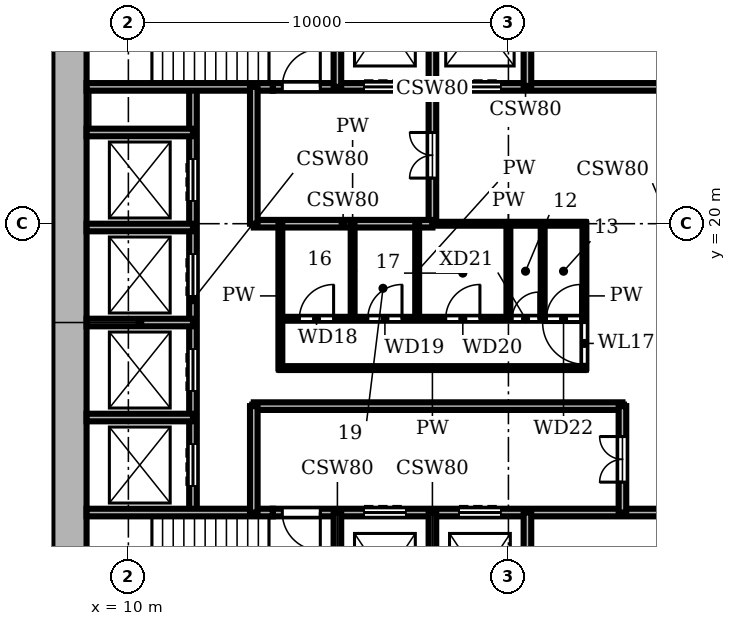
"""IFC4 building model, lengths in metres.
Left out: names, types, materials, properties, quantities, classifications, styles, units other than length and angle.
Written with IfcOpenShell. Run it as: python <this file> out.ifc"""

import sys

from ifc_helpers import new_model, si_unit, direction, frame, frame_2d, origin, place, context, subcontext, project, spatial, rectangle, extrude, element, fill, save


model = new_model("IFC4")
c1 = context("Model", 3, precision=1e-05, world=origin(), true_north=direction((0.0, 1.0)))
c2 = subcontext(c1, "Body", "Model", "MODEL_VIEW")
j1 = project(units=[si_unit("LENGTHUNIT", "METRE"), si_unit("PLANEANGLEUNIT", "RADIAN")], contexts=[c1])
p1 = place(None, origin())
s1 = spatial("IfcSite", under=j1, at=p1, CompositionType="ELEMENT")
p2 = place(p1, origin())
s2 = spatial("IfcBuilding", under=s1, at=p2, CompositionType="ELEMENT")
p3 = place(p2, frame((0.0, 0.0, 82.2)))
s3 = spatial("IfcBuildingStorey", under=s2, at=p3, CompositionType="ELEMENT", Elevation=82.2)
p4 = place(p3, frame((8.45, 27.1, 0.0), z_axis=(0.0, 0.0, 1.0), x_axis=(0.0, -1.0, 0.0)))
e1 = element("IfcWall", 1, at=p4, inside=s3, PredefinedType="SHEAR", context=c2, shape_type="SweptSolid", body=[
    extrude(rectangle(XDim=18.2, YDim=0.9, at=frame_2d((9.1, 0.0))), origin(), (0.0, 0.0, 1.0), 3.9),
])
p5 = place(p3, frame((8.9, 12.4, 0.0), z_axis=(0.0, 0.0, 1.0), x_axis=(1.0, 0.0, 0.0)))
e2 = element("IfcWall", 2, at=p5, inside=s3, PredefinedType="SHEAR", context=c2, shape_type="SweptSolid", body=[
    extrude(rectangle(XDim=4.9, YDim=0.2, at=frame_2d((2.45, 0.0))), origin(), (0.0, 0.0, 1.0), 3.58),
])
p6 = place(p3, frame((13.8, 12.4, 0.0), z_axis=(0.0, 0.0, 1.0), x_axis=(1.0, 0.0, 0.0)))
e3 = element("IfcWall", 3, at=p6, inside=s3, PredefinedType="SHEAR", context=c2, shape_type="SweptSolid", body=[
    extrude(rectangle(XDim=13.3, YDim=0.2, at=frame_2d((6.65, 0.0))), origin(), (0.0, 0.0, 1.0), 3.58),
])
p7 = place(p6, frame((2.4, 0.0, 0.0)))
e4 = element("IfcOpeningElement", 4, at=p7, cuts=e3, PredefinedType="OPENING", context=c2, shape_type="SweptSolid", body=[
    extrude(rectangle(XDim=1.1, YDim=2.1, at=frame_2d((0.55, 1.05))), frame((0.0, 0.11, 0.0), z_axis=(0.0, -1.0, 0.0), x_axis=(1.0, 0.0, 0.0)), (0.0, 0.0, 1.0), 0.22),
])
p8 = place(p6, frame((4.9, 0.0, 0.0)))
e5 = element("IfcOpeningElement", 5, at=p8, cuts=e3, PredefinedType="OPENING", context=c2, shape_type="SweptSolid", body=[
    extrude(rectangle(XDim=1.1, YDim=2.1, at=frame_2d((0.55, 1.05))), frame((0.0, 0.11, 0.0), z_axis=(0.0, -1.0, 0.0), x_axis=(1.0, 0.0, 0.0)), (0.0, 0.0, 1.0), 0.22),
])
p9 = place(p6, frame((0.25, 0.0, 0.0)))
e6 = element("IfcOpeningElement", 6, at=p9, cuts=e3, PredefinedType="OPENING", context=c2, shape_type="SweptSolid", body=[
    extrude(rectangle(XDim=1.0, YDim=2.1, at=frame_2d((0.5, 1.05))), frame((0.0, 0.11, 0.0), z_axis=(0.0, -1.0, 0.0), x_axis=(1.0, 0.0, 0.0)), (0.0, 0.0, 1.0), 0.22),
])
p10 = place(p3, frame((8.9, 14.9, 0.0), z_axis=(0.0, 0.0, 1.0), x_axis=(1.0, 0.0, 0.0)))
e7 = element("IfcWall", 7, at=p10, inside=s3, PredefinedType="SHEAR", context=c2, shape_type="SweptSolid", body=[
    extrude(rectangle(XDim=2.8, YDim=0.2, at=frame_2d((1.4, 0.0))), origin(), (0.0, 0.0, 1.0), 3.58),
])
p11 = place(p3, frame((13.3, 15.2, 0.0), z_axis=(0.0, 0.0, 1.0), x_axis=(1.0, 0.0, 0.0)))
e8 = element("IfcWall", 8, at=p11, inside=s3, PredefinedType="SHEAR", context=c2, shape_type="SweptSolid", body=[
    extrude(rectangle(XDim=9.7, YDim=0.2, at=frame_2d((4.85, 0.0))), origin(), (0.0, 0.0, 1.0), 3.58),
])
p12 = place(p3, frame((14.0, 16.2, 0.0), z_axis=(0.0, 0.0, 1.0), x_axis=(1.0, 0.0, 0.0)))
e9 = element("IfcWall", 9, at=p12, inside=s3, PredefinedType="PARTITIONING", context=c2, shape_type="SweptSolid", body=[
    extrude(rectangle(XDim=8.0, YDim=0.1, at=frame_2d((4.0, 0.0))), origin(), (0.0, 0.0, 1.0), 3.58),
])
p13 = place(p3, frame((8.9, 17.4, 0.0), z_axis=(0.0, 0.0, 1.0), x_axis=(1.0, 0.0, 0.0)))
e10 = element("IfcWall", 10, at=p13, inside=s3, PredefinedType="SHEAR", context=c2, shape_type="SweptSolid", body=[
    extrude(rectangle(XDim=2.8, YDim=0.2, at=frame_2d((1.4, 0.0))), origin(), (0.0, 0.0, 1.0), 3.58),
])
p14 = place(p3, frame((14.0, 17.5, 0.0), z_axis=(0.0, 0.0, 1.0), x_axis=(1.0, 0.0, 0.0)))
e11 = element("IfcWall", 11, at=p14, inside=s3, PredefinedType="PARTITIONING", context=c2, shape_type="SweptSolid", body=[
    extrude(rectangle(XDim=8.0, YDim=0.1, at=frame_2d((4.0, 0.0))), origin(), (0.0, 0.0, 1.0), 3.58),
])
p15 = place(p14, frame((0.5, 0.0, 0.0)))
e12 = element("IfcOpeningElement", 12, at=p15, cuts=e11, PredefinedType="OPENING", context=c2, shape_type="SweptSolid", body=[
    extrude(rectangle(XDim=0.9, YDim=2.1, at=frame_2d((0.45, 1.05))), frame((0.0, 0.06, 0.0), z_axis=(0.0, -1.0, 0.0), x_axis=(1.0, 0.0, 0.0)), (0.0, 0.0, 1.0), 0.12),
])
p16 = place(p14, frame((2.3, 0.0, 0.0)))
e13 = element("IfcOpeningElement", 13, at=p16, cuts=e11, PredefinedType="OPENING", context=c2, shape_type="SweptSolid", body=[
    extrude(rectangle(XDim=0.9, YDim=2.1, at=frame_2d((0.45, 1.05))), frame((0.0, 0.06, 0.0), z_axis=(0.0, -1.0, 0.0), x_axis=(1.0, 0.0, 0.0)), (0.0, 0.0, 1.0), 0.12),
])
p17 = place(p14, frame((4.35, 0.0, 0.0)))
e14 = element("IfcOpeningElement", 14, at=p17, cuts=e11, PredefinedType="OPENING", context=c2, shape_type="SweptSolid", body=[
    extrude(rectangle(XDim=0.9, YDim=2.1, at=frame_2d((0.45, 1.05))), frame((0.0, 0.06, 0.0), z_axis=(0.0, -1.0, 0.0), x_axis=(1.0, 0.0, 0.0)), (0.0, 0.0, 1.0), 0.12),
])
p18 = place(p14, frame((6.1, 0.0, 0.0)))
e15 = element("IfcOpeningElement", 15, at=p18, cuts=e11, PredefinedType="OPENING", context=c2, shape_type="SweptSolid", body=[
    extrude(rectangle(XDim=0.7, YDim=2.1, at=frame_2d((0.35, 1.05))), frame((0.0, 0.06, 0.0), z_axis=(0.0, -1.0, 0.0), x_axis=(1.0, 0.0, 0.0)), (0.0, 0.0, 1.0), 0.12),
])
p19 = place(p14, frame((7.0, 0.0, 0.0)))
e16 = element("IfcOpeningElement", 16, at=p19, cuts=e11, PredefinedType="OPENING", context=c2, shape_type="SweptSolid", body=[
    extrude(rectangle(XDim=0.9, YDim=2.1, at=frame_2d((0.45, 1.05))), frame((0.0, 0.06, 0.0), z_axis=(0.0, -1.0, 0.0), x_axis=(1.0, 0.0, 0.0)), (0.0, 0.0, 1.0), 0.12),
])
p20 = place(p3, frame((8.9, 19.9, 0.0), z_axis=(0.0, 0.0, 1.0), x_axis=(1.0, 0.0, 0.0)))
e17 = element("IfcWall", 17, at=p20, inside=s3, PredefinedType="SHEAR", context=c2, shape_type="SweptSolid", body=[
    extrude(rectangle(XDim=2.8, YDim=0.2, at=frame_2d((1.4, 0.0))), origin(), (0.0, 0.0, 1.0), 3.58),
])
p21 = place(p3, frame((18.0, 20.0, 0.0), z_axis=(0.0, 0.0, 1.0), x_axis=(1.0, 0.0, 0.0)))
e18 = element("IfcWall", 18, at=p21, inside=s3, PredefinedType="PARTITIONING", context=c2, shape_type="SweptSolid", body=[
    extrude(rectangle(XDim=4.0, YDim=0.1, at=frame_2d((2.0, 0.0))), origin(), (0.0, 0.0, 1.0), 3.58),
])
p22 = place(p3, frame((13.3, 20.0, 0.0), z_axis=(0.0, 0.0, 1.0), x_axis=(1.0, 0.0, 0.0)))
e19 = element("IfcWall", 19, at=p22, inside=s3, PredefinedType="SHEAR", context=c2, shape_type="SweptSolid", body=[
    extrude(rectangle(XDim=4.7, YDim=0.2, at=frame_2d((2.35, 0.0))), origin(), (0.0, 0.0, 1.0), 3.58),
])
p23 = place(p3, frame((8.9, 22.4, 0.0), z_axis=(0.0, 0.0, 1.0), x_axis=(1.0, 0.0, 0.0)))
e20 = element("IfcWall", 20, at=p23, inside=s3, PredefinedType="SHEAR", context=c2, shape_type="SweptSolid", body=[
    extrude(rectangle(XDim=2.8, YDim=0.2, at=frame_2d((1.4, 0.0))), origin(), (0.0, 0.0, 1.0), 3.58),
])
p24 = place(p3, frame((8.9, 23.6, 0.0), z_axis=(0.0, 0.0, 1.0), x_axis=(1.0, 0.0, 0.0)))
e21 = element("IfcWall", 21, at=p24, inside=s3, PredefinedType="SHEAR", context=c2, shape_type="SweptSolid", body=[
    extrude(rectangle(XDim=4.9, YDim=0.2, at=frame_2d((2.45, 0.0))), origin(), (0.0, 0.0, 1.0), 3.58),
])
p25 = place(p3, frame((13.8, 23.6, 0.0), z_axis=(0.0, 0.0, 1.0), x_axis=(1.0, 0.0, 0.0)))
e22 = element("IfcWall", 22, at=p25, inside=s3, PredefinedType="SHEAR", context=c2, shape_type="SweptSolid", body=[
    extrude(rectangle(XDim=13.3, YDim=0.2, at=frame_2d((6.65, 0.0))), origin(), (0.0, 0.0, 1.0), 3.58),
])
p26 = place(p25, frame((2.4, 0.0, 0.0)))
e23 = element("IfcOpeningElement", 23, at=p26, cuts=e22, PredefinedType="OPENING", context=c2, shape_type="SweptSolid", body=[
    extrude(rectangle(XDim=1.1, YDim=2.1, at=frame_2d((0.55, 1.05))), frame((0.0, 0.11, 0.0), z_axis=(0.0, -1.0, 0.0), x_axis=(1.0, 0.0, 0.0)), (0.0, 0.0, 1.0), 0.22),
])
p27 = place(p25, frame((4.9, 0.0, 0.0)))
e24 = element("IfcOpeningElement", 24, at=p27, cuts=e22, PredefinedType="OPENING", context=c2, shape_type="SweptSolid", body=[
    extrude(rectangle(XDim=1.1, YDim=2.1, at=frame_2d((0.55, 1.05))), frame((0.0, 0.11, 0.0), z_axis=(0.0, -1.0, 0.0), x_axis=(1.0, 0.0, 0.0)), (0.0, 0.0, 1.0), 0.22),
])
p28 = place(p25, frame((0.25, 0.0, 0.0)))
e25 = element("IfcOpeningElement", 25, at=p28, cuts=e22, PredefinedType="OPENING", context=c2, shape_type="SweptSolid", body=[
    extrude(rectangle(XDim=1.0, YDim=2.1, at=frame_2d((0.5, 1.05))), frame((0.0, 0.11, 0.0), z_axis=(0.0, -1.0, 0.0), x_axis=(1.0, 0.0, 0.0)), (0.0, 0.0, 1.0), 0.22),
])
p29 = place(p3, frame((11.7, 12.4, 0.0), z_axis=(0.0, 0.0, 1.0), x_axis=(0.0, 1.0, 0.0)))
e26 = element("IfcWall", 26, at=p29, inside=s3, PredefinedType="SHEAR", context=c2, shape_type="SweptSolid", body=[
    extrude(rectangle(XDim=11.2, YDim=0.2, at=frame_2d((5.6, 0.0))), origin(), (0.0, 0.0, 1.0), 3.58),
])
p30 = place(p29, frame((0.7, 0.0, 0.0)))
e27 = element("IfcOpeningElement", 27, at=p30, cuts=e26, PredefinedType="OPENING", context=c2, shape_type="SweptSolid", body=[
    extrude(rectangle(XDim=1.1, YDim=2.1, at=frame_2d((0.55, 1.05))), frame((0.0, 0.11, 0.0), z_axis=(0.0, -1.0, 0.0), x_axis=(1.0, 0.0, 0.0)), (0.0, 0.0, 1.0), 0.22),
])
p31 = place(p29, frame((3.2, 0.0, 0.0)))
e28 = element("IfcOpeningElement", 28, at=p31, cuts=e26, PredefinedType="OPENING", context=c2, shape_type="SweptSolid", body=[
    extrude(rectangle(XDim=1.1, YDim=2.1, at=frame_2d((0.55, 1.05))), frame((0.0, 0.11, 0.0), z_axis=(0.0, -1.0, 0.0), x_axis=(1.0, 0.0, 0.0)), (0.0, 0.0, 1.0), 0.22),
])
p32 = place(p29, frame((5.7, 0.0, 0.0)))
e29 = element("IfcOpeningElement", 29, at=p32, cuts=e26, PredefinedType="OPENING", context=c2, shape_type="SweptSolid", body=[
    extrude(rectangle(XDim=1.1, YDim=2.1, at=frame_2d((0.55, 1.05))), frame((0.0, 0.11, 0.0), z_axis=(0.0, -1.0, 0.0), x_axis=(1.0, 0.0, 0.0)), (0.0, 0.0, 1.0), 0.22),
])
p33 = place(p29, frame((8.2, 0.0, 0.0)))
e30 = element("IfcOpeningElement", 30, at=p33, cuts=e26, PredefinedType="OPENING", context=c2, shape_type="SweptSolid", body=[
    extrude(rectangle(XDim=1.1, YDim=2.1, at=frame_2d((0.55, 1.05))), frame((0.0, 0.11, 0.0), z_axis=(0.0, -1.0, 0.0), x_axis=(1.0, 0.0, 0.0)), (0.0, 0.0, 1.0), 0.22),
])
p34 = place(p3, frame((13.3, 12.4, 0.0), z_axis=(0.0, 0.0, 1.0), x_axis=(0.0, 1.0, 0.0)))
e31 = element("IfcWall", 31, at=p34, inside=s3, PredefinedType="SHEAR", context=c2, shape_type="SweptSolid", body=[
    extrude(rectangle(XDim=2.8, YDim=0.2, at=frame_2d((1.4, 0.0))), origin(), (0.0, 0.0, 1.0), 3.58),
])
p35 = place(p3, frame((13.3, 20.0, 0.0), z_axis=(0.0, 0.0, 1.0), x_axis=(0.0, 1.0, 0.0)))
e32 = element("IfcWall", 32, at=p35, inside=s3, PredefinedType="SHEAR", context=c2, shape_type="SweptSolid", body=[
    extrude(rectangle(XDim=3.6, YDim=0.2, at=frame_2d((1.8, 0.0))), origin(), (0.0, 0.0, 1.0), 3.58),
])
p36 = place(p3, frame((14.0, 16.2, 0.0), z_axis=(0.0, 0.0, 1.0), x_axis=(0.0, 1.0, 0.0)))
e33 = element("IfcWall", 33, at=p36, inside=s3, PredefinedType="PARTITIONING", context=c2, shape_type="SweptSolid", body=[
    extrude(rectangle(XDim=3.8, YDim=0.1, at=frame_2d((1.9, 0.0))), origin(), (0.0, 0.0, 1.0), 3.58),
])
for number, where, z_axis, x_axis in (
    (34, (15.5, 8.9, 0.0), (0.0, 0.0, 1.0), (0.0, 1.0, 0.0)),
    (35, (15.5, 23.6, 0.0), (0.0, 0.0, 1.0), (0.0, 1.0, 0.0)),
):
    element("IfcWall", number, at=place(p3, frame(where, z_axis=z_axis, x_axis=x_axis)), inside=s3, PredefinedType="SHEAR", context=c2, shape_type="SweptSolid", body=[
        extrude(rectangle(XDim=3.5, YDim=0.2, at=frame_2d((1.75, 0.0))), origin(), (0.0, 0.0, 1.0), 3.58),
    ])
for number, where, z_axis, x_axis in (
    (36, (15.9, 17.5, 0.0), (0.0, 0.0, 1.0), (0.0, 1.0, 0.0)),
    (37, (17.6, 17.5, 0.0), (0.0, 0.0, 1.0), (0.0, 1.0, 0.0)),
):
    element("IfcWall", number, at=place(p3, frame(where, z_axis=z_axis, x_axis=x_axis)), inside=s3, PredefinedType="PARTITIONING", context=c2, shape_type="SweptSolid", body=[
        extrude(rectangle(XDim=2.5, YDim=0.1, at=frame_2d((1.25, 0.0))), origin(), (0.0, 0.0, 1.0), 3.58),
    ])
p37 = place(p3, frame((18.0, 8.9, 0.0), z_axis=(0.0, 0.0, 1.0), x_axis=(0.0, 1.0, 0.0)))
e38 = element("IfcWall", 38, at=p37, inside=s3, PredefinedType="SHEAR", context=c2, shape_type="SweptSolid", body=[
    extrude(rectangle(XDim=3.5, YDim=0.2, at=frame_2d((1.75, 0.0))), origin(), (0.0, 0.0, 1.0), 3.58),
])
p38 = place(p3, frame((18.0, 20.0, 0.0), z_axis=(0.0, 0.0, 1.0), x_axis=(0.0, 1.0, 0.0)))
e39 = element("IfcWall", 39, at=p38, inside=s3, PredefinedType="SHEAR", context=c2, shape_type="SweptSolid", body=[
    extrude(rectangle(XDim=7.1, YDim=0.2, at=frame_2d((3.55, 0.0))), origin(), (0.0, 0.0, 1.0), 3.58),
])
p39 = place(p38, frame((1.2, 0.0, 0.0)))
e40 = element("IfcOpeningElement", 40, at=p39, cuts=e39, PredefinedType="OPENING", context=c2, shape_type="SweptSolid", body=[
    extrude(rectangle(XDim=1.2, YDim=2.1, at=frame_2d((0.6, 1.05))), frame((0.0, 0.11, 0.0), z_axis=(0.0, -1.0, 0.0), x_axis=(1.0, 0.0, 0.0)), (0.0, 0.0, 1.0), 0.22),
])
p40 = place(p3, frame((20.0, 17.5, 0.0), z_axis=(0.0, 0.0, 1.0), x_axis=(0.0, 1.0, 0.0)))
e41 = element("IfcWall", 41, at=p40, inside=s3, PredefinedType="PARTITIONING", context=c2, shape_type="SweptSolid", body=[
    extrude(rectangle(XDim=2.5, YDim=0.1, at=frame_2d((1.25, 0.0))), origin(), (0.0, 0.0, 1.0), 3.58),
])
for number, where, z_axis, x_axis in (
    (42, (20.5, 8.9, 0.0), (0.0, 0.0, 1.0), (0.0, 1.0, 0.0)),
    (43, (20.5, 23.6, 0.0), (0.0, 0.0, 1.0), (0.0, 1.0, 0.0)),
):
    element("IfcWall", number, at=place(p3, frame(where, z_axis=z_axis, x_axis=x_axis)), inside=s3, PredefinedType="SHEAR", context=c2, shape_type="SweptSolid", body=[
        extrude(rectangle(XDim=3.5, YDim=0.2, at=frame_2d((1.75, 0.0))), origin(), (0.0, 0.0, 1.0), 3.58),
    ])
p41 = place(p3, frame((20.9, 17.5, 0.0), z_axis=(0.0, 0.0, 1.0), x_axis=(0.0, 1.0, 0.0)))
e44 = element("IfcWall", 44, at=p41, inside=s3, PredefinedType="PARTITIONING", context=c2, shape_type="SweptSolid", body=[
    extrude(rectangle(XDim=2.5, YDim=0.1, at=frame_2d((1.25, 0.0))), origin(), (0.0, 0.0, 1.0), 3.58),
])
p42 = place(p3, frame((22.0, 16.2, 0.0), z_axis=(0.0, 0.0, 1.0), x_axis=(0.0, 1.0, 0.0)))
e45 = element("IfcWall", 45, at=p42, inside=s3, PredefinedType="PARTITIONING", context=c2, shape_type="SweptSolid", body=[
    extrude(rectangle(XDim=3.8, YDim=0.1, at=frame_2d((1.9, 0.0))), origin(), (0.0, 0.0, 1.0), 3.58),
])
p43 = place(p42, frame((0.1, 0.0, 0.0)))
e46 = element("IfcOpeningElement", 46, at=p43, cuts=e45, PredefinedType="OPENING", context=c2, shape_type="SweptSolid", body=[
    extrude(rectangle(XDim=1.1, YDim=2.1, at=frame_2d((0.55, 1.05))), frame((0.0, 0.06, 0.0), z_axis=(0.0, -1.0, 0.0), x_axis=(1.0, 0.0, 0.0)), (0.0, 0.0, 1.0), 0.12),
])
p44 = place(p3, frame((23.0, 12.4, 0.0), z_axis=(0.0, 0.0, 1.0), x_axis=(0.0, 1.0, 0.0)))
e47 = element("IfcWall", 47, at=p44, inside=s3, PredefinedType="SHEAR", context=c2, shape_type="SweptSolid", body=[
    extrude(rectangle(XDim=2.8, YDim=0.2, at=frame_2d((1.4, 0.0))), origin(), (0.0, 0.0, 1.0), 3.58),
])
p45 = place(p44, frame((0.8, 0.0, 0.0)))
e48 = element("IfcOpeningElement", 48, at=p45, cuts=e47, PredefinedType="OPENING", context=c2, shape_type="SweptSolid", body=[
    extrude(rectangle(XDim=1.2, YDim=2.1, at=frame_2d((0.6, 1.05))), frame((0.0, 0.11, 0.0), z_axis=(0.0, -1.0, 0.0), x_axis=(1.0, 0.0, 0.0)), (0.0, 0.0, 1.0), 0.22),
])
p46 = place(p30, origin())
e49 = element("IfcDoor", 49, at=p46, inside=s3, OperationType="DOUBLE_DOOR_SLIDING", PredefinedType="DOOR", context=c2, shape_type="SweptSolid", body=[
    extrude(rectangle(XDim=1.1, YDim=2.1, at=frame_2d((0.55, 1.05))), frame((0.0, 0.025, 0.0), z_axis=(0.0, -1.0, 0.0), x_axis=(1.0, 0.0, 0.0)), (0.0, 0.0, 1.0), 0.05),
])
fill(e27, e49)
p47 = place(p31, origin())
e50 = element("IfcDoor", 50, at=p47, inside=s3, OperationType="DOUBLE_DOOR_SLIDING", PredefinedType="DOOR", context=c2, shape_type="SweptSolid", body=[
    extrude(rectangle(XDim=1.1, YDim=2.1, at=frame_2d((0.55, 1.05))), frame((0.0, 0.025, 0.0), z_axis=(0.0, -1.0, 0.0), x_axis=(1.0, 0.0, 0.0)), (0.0, 0.0, 1.0), 0.05),
])
fill(e28, e50)
p48 = place(p32, origin())
e51 = element("IfcDoor", 51, at=p48, inside=s3, OperationType="DOUBLE_DOOR_SLIDING", PredefinedType="DOOR", context=c2, shape_type="SweptSolid", body=[
    extrude(rectangle(XDim=1.1, YDim=2.1, at=frame_2d((0.55, 1.05))), frame((0.0, 0.025, 0.0), z_axis=(0.0, -1.0, 0.0), x_axis=(1.0, 0.0, 0.0)), (0.0, 0.0, 1.0), 0.05),
])
fill(e29, e51)
p49 = place(p33, origin())
e52 = element("IfcDoor", 52, at=p49, inside=s3, OperationType="DOUBLE_DOOR_SLIDING", PredefinedType="DOOR", context=c2, shape_type="SweptSolid", body=[
    extrude(rectangle(XDim=1.1, YDim=2.1, at=frame_2d((0.55, 1.05))), frame((0.0, 0.025, 0.0), z_axis=(0.0, -1.0, 0.0), x_axis=(1.0, 0.0, 0.0)), (0.0, 0.0, 1.0), 0.05),
])
fill(e30, e52)
p50 = place(p7, origin())
e53 = element("IfcDoor", 53, at=p50, inside=s3, OperationType="DOUBLE_DOOR_SLIDING", PredefinedType="DOOR", context=c2, shape_type="SweptSolid", body=[
    extrude(rectangle(XDim=1.1, YDim=2.1, at=frame_2d((0.55, 1.05))), frame((0.0, 0.025, 0.0), z_axis=(0.0, -1.0, 0.0), x_axis=(1.0, 0.0, 0.0)), (0.0, 0.0, 1.0), 0.05),
])
fill(e4, e53)
p51 = place(p8, origin())
e54 = element("IfcDoor", 54, at=p51, inside=s3, OperationType="DOUBLE_DOOR_SLIDING", PredefinedType="DOOR", context=c2, shape_type="SweptSolid", body=[
    extrude(rectangle(XDim=1.1, YDim=2.1, at=frame_2d((0.55, 1.05))), frame((0.0, 0.025, 0.0), z_axis=(0.0, -1.0, 0.0), x_axis=(1.0, 0.0, 0.0)), (0.0, 0.0, 1.0), 0.05),
])
fill(e5, e54)
p52 = place(p26, origin())
e55 = element("IfcDoor", 55, at=p52, inside=s3, OperationType="DOUBLE_DOOR_SLIDING", PredefinedType="DOOR", context=c2, shape_type="SweptSolid", body=[
    extrude(rectangle(XDim=1.1, YDim=2.1, at=frame_2d((0.55, 1.05))), frame((0.0, 0.025, 0.0), z_axis=(0.0, -1.0, 0.0), x_axis=(1.0, 0.0, 0.0)), (0.0, 0.0, 1.0), 0.05),
])
fill(e23, e55)
p53 = place(p27, origin())
e56 = element("IfcDoor", 56, at=p53, inside=s3, OperationType="DOUBLE_DOOR_SLIDING", PredefinedType="DOOR", context=c2, shape_type="SweptSolid", body=[
    extrude(rectangle(XDim=1.1, YDim=2.1, at=frame_2d((0.55, 1.05))), frame((0.0, 0.025, 0.0), z_axis=(0.0, -1.0, 0.0), x_axis=(1.0, 0.0, 0.0)), (0.0, 0.0, 1.0), 0.05),
])
fill(e24, e56)
p54 = place(p9, frame((1.0, 0.0, 0.0), z_axis=(0.0, 0.0, 1.0), x_axis=(-1.0, 0.0, 0.0)))
e57 = element("IfcDoor", 57, at=p54, inside=s3, OperationType="SINGLE_SWING_LEFT", PredefinedType="DOOR", context=c2, shape_type="SweptSolid", body=[
    extrude(rectangle(XDim=1.0, YDim=2.1, at=frame_2d((0.5, 1.05))), frame((0.0, 0.025, 0.0), z_axis=(0.0, -1.0, 0.0), x_axis=(1.0, 0.0, 0.0)), (0.0, 0.0, 1.0), 0.05),
])
fill(e6, e57)
p55 = place(p28, origin())
e58 = element("IfcDoor", 58, at=p55, inside=s3, OperationType="SINGLE_SWING_RIGHT", PredefinedType="DOOR", context=c2, shape_type="SweptSolid", body=[
    extrude(rectangle(XDim=1.0, YDim=2.1, at=frame_2d((0.5, 1.05))), frame((0.0, 0.025, 0.0), z_axis=(0.0, -1.0, 0.0), x_axis=(1.0, 0.0, 0.0)), (0.0, 0.0, 1.0), 0.05),
])
fill(e25, e58)
p56 = place(p45, origin())
e59 = element("IfcDoor", 59, at=p56, inside=s3, OperationType="DOUBLE_DOOR_SINGLE_SWING", PredefinedType="DOOR", context=c2, shape_type="SweptSolid", body=[
    extrude(rectangle(XDim=1.2, YDim=2.1, at=frame_2d((0.6, 1.05))), frame((0.0, 0.025, 0.0), z_axis=(0.0, -1.0, 0.0), x_axis=(1.0, 0.0, 0.0)), (0.0, 0.0, 1.0), 0.05),
])
fill(e48, e59)
p57 = place(p39, origin())
e60 = element("IfcDoor", 60, at=p57, inside=s3, OperationType="DOUBLE_DOOR_SINGLE_SWING", PredefinedType="DOOR", context=c2, shape_type="SweptSolid", body=[
    extrude(rectangle(XDim=1.2, YDim=2.1, at=frame_2d((0.6, 1.05))), frame((0.0, 0.025, 0.0), z_axis=(0.0, -1.0, 0.0), x_axis=(1.0, 0.0, 0.0)), (0.0, 0.0, 1.0), 0.05),
])
fill(e40, e60)
p58 = place(p43, origin())
e61 = element("IfcDoor", 61, at=p58, inside=s3, OperationType="SINGLE_SWING_RIGHT", PredefinedType="DOOR", context=c2, shape_type="SweptSolid", body=[
    extrude(rectangle(XDim=1.1, YDim=2.1, at=frame_2d((0.55, 1.05))), frame((0.0, 0.025, 0.0), z_axis=(0.0, -1.0, 0.0), x_axis=(1.0, 0.0, 0.0)), (0.0, 0.0, 1.0), 0.05),
])
fill(e46, e61)
p59 = place(p15, origin())
e62 = element("IfcDoor", 62, at=p59, inside=s3, OperationType="SINGLE_SWING_RIGHT", PredefinedType="DOOR", context=c2, shape_type="SweptSolid", body=[
    extrude(rectangle(XDim=0.9, YDim=2.1, at=frame_2d((0.45, 1.05))), frame((0.0, 0.025, 0.0), z_axis=(0.0, -1.0, 0.0), x_axis=(1.0, 0.0, 0.0)), (0.0, 0.0, 1.0), 0.05),
])
fill(e12, e62)
p60 = place(p16, origin())
e63 = element("IfcDoor", 63, at=p60, inside=s3, OperationType="SINGLE_SWING_RIGHT", PredefinedType="DOOR", context=c2, shape_type="SweptSolid", body=[
    extrude(rectangle(XDim=0.9, YDim=2.1, at=frame_2d((0.45, 1.05))), frame((0.0, 0.025, 0.0), z_axis=(0.0, -1.0, 0.0), x_axis=(1.0, 0.0, 0.0)), (0.0, 0.0, 1.0), 0.05),
])
fill(e13, e63)
p61 = place(p17, origin())
e64 = element("IfcDoor", 64, at=p61, inside=s3, OperationType="SINGLE_SWING_RIGHT", PredefinedType="DOOR", context=c2, shape_type="SweptSolid", body=[
    extrude(rectangle(XDim=0.9, YDim=2.1, at=frame_2d((0.45, 1.05))), frame((0.0, 0.025, 0.0), z_axis=(0.0, -1.0, 0.0), x_axis=(1.0, 0.0, 0.0)), (0.0, 0.0, 1.0), 0.05),
])
fill(e14, e64)
p62 = place(p18, origin())
e65 = element("IfcDoor", 65, at=p62, inside=s3, OperationType="SINGLE_SWING_RIGHT", PredefinedType="DOOR", context=c2, shape_type="SweptSolid", body=[
    extrude(rectangle(XDim=0.7, YDim=2.1, at=frame_2d((0.35, 1.05))), frame((0.0, 0.025, 0.0), z_axis=(0.0, -1.0, 0.0), x_axis=(1.0, 0.0, 0.0)), (0.0, 0.0, 1.0), 0.05),
])
fill(e15, e65)
p63 = place(p19, origin())
e66 = element("IfcDoor", 66, at=p63, inside=s3, OperationType="SINGLE_SWING_RIGHT", PredefinedType="DOOR", context=c2, shape_type="SweptSolid", body=[
    extrude(rectangle(XDim=0.9, YDim=2.1, at=frame_2d((0.45, 1.05))), frame((0.0, 0.025, 0.0), z_axis=(0.0, -1.0, 0.0), x_axis=(1.0, 0.0, 0.0)), (0.0, 0.0, 1.0), 0.05),
])
fill(e16, e66)
save(model, sys.argv[1])
